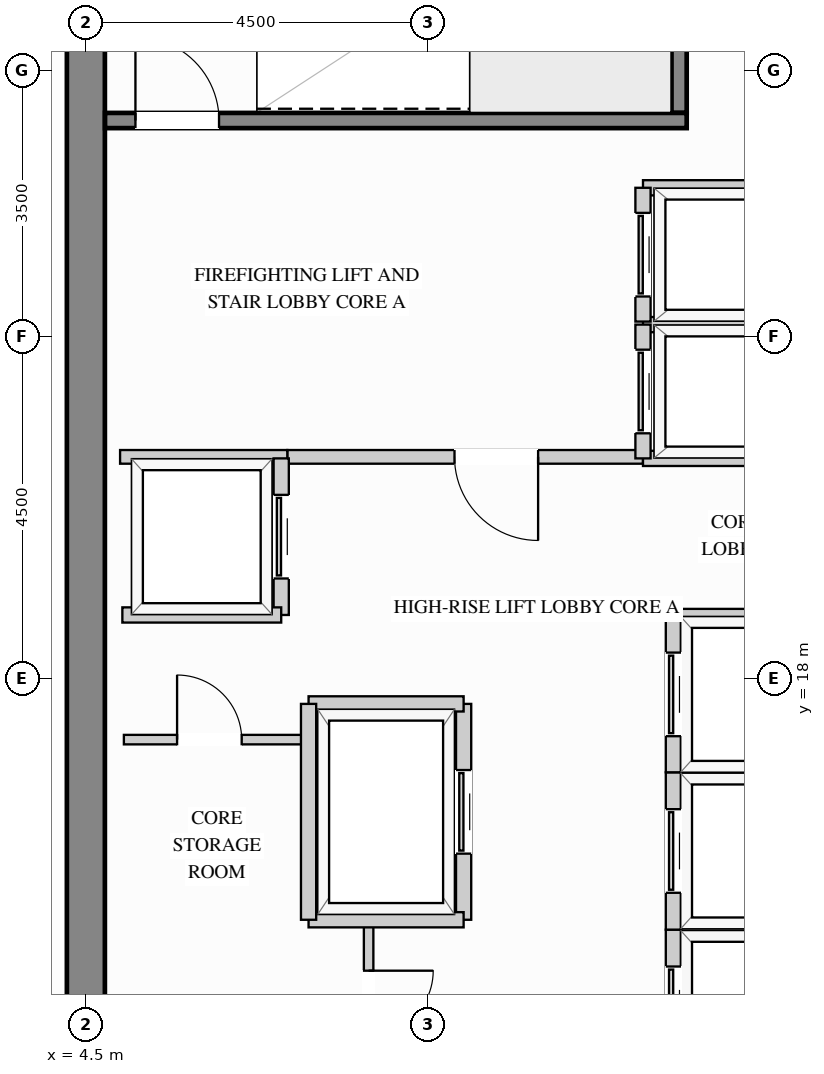
"""IFC4 building model, lengths in metres.
Left out: names, types, materials, properties, quantities, classifications, styles, units other than length and angle.
Written with IfcOpenShell. Run it as: python <this file> out.ifc"""

import sys

from ifc_helpers import new_model, si_unit, direction, frame, frame_2d, origin, place, context, subcontext, project, spatial, rectangle, extrude, source, transform, mapped, element, fill, save


model = new_model("IFC4")
c1 = context("Model", 3, precision=1e-05, world=origin(), true_north=direction((0.0, 1.0)))
c2 = subcontext(c1, "Body", "Model", "MODEL_VIEW")
j1 = project(units=[si_unit("LENGTHUNIT", "METRE"), si_unit("PLANEANGLEUNIT", "RADIAN")], contexts=[c1])
p1 = place(None, origin())
s1 = spatial("IfcSite", under=j1, at=p1, CompositionType="ELEMENT")
p2 = place(p1, origin())
s2 = spatial("IfcBuilding", under=s1, at=p2, CompositionType="ELEMENT")
p3 = place(p2, frame((0.0, 0.0, 216.0)))
s3 = spatial("IfcBuildingStorey", under=s2, at=p3, CompositionType="ELEMENT", Elevation=216.0)
m1 = source(origin(), c2, "Body", "SweptSolid", [
    extrude(rectangle(XDim=20.5, YDim=0.5, at=frame_2d((10.25, 0.0))), origin(), (0.0, 0.0, 1.0), 3.4),
])
p4 = place(p3, frame((4.5, 8.75, 0.0), z_axis=(0.0, 0.0, 1.0), x_axis=(0.0, 1.0, 0.0)))
e1 = element("IfcWall", 1, at=p4, inside=s3, PredefinedType="SHEAR", context=c2, shape_type="MappedRepresentation", body=[
    mapped(m1, transform((0.0, 0.0, 0.0), x_axis=(1.0, 0.0, 0.0), y_axis=(0.0, 1.0, 0.0), z_axis=(0.0, 0.0, 1.0))),
])
p5 = place(p3, frame((7.15, 20.92, 0.0), z_axis=(0.0, 0.0, 1.0), x_axis=(1.0, 0.0, 0.0)))
e2 = element("IfcWall", 2, at=p5, inside=s3, PredefinedType="PARTITIONING", context=c2, shape_type="SweptSolid", body=[
    extrude(rectangle(XDim=4.68, YDim=0.18, at=frame_2d((2.34, 0.0))), origin(), (0.0, 0.0, 1.0), 3.385),
])
p6 = place(p5, frame((2.2, 0.0, 0.0)))
e3 = element("IfcOpeningElement", 3, at=p6, cuts=e2, PredefinedType="OPENING", context=c2, shape_type="SweptSolid", body=[
    extrude(rectangle(XDim=1.1, YDim=2.15, at=frame_2d((0.55, 1.075))), frame((0.0, 0.1, 0.0), z_axis=(0.0, -1.0, 0.0), x_axis=(1.0, 0.0, 0.0)), (0.0, 0.0, 1.0), 0.2),
])
m2 = source(origin(), c2, "Body", "SweptSolid", [
    extrude(rectangle(XDim=2.2, YDim=0.18, at=frame_2d((1.1, 0.0))), origin(), (0.0, 0.0, 1.0), 3.385),
])
p7 = place(p3, frame((4.95, 20.92, 0.0), z_axis=(0.0, 0.0, 1.0), x_axis=(1.0, 0.0, 0.0)))
e4 = element("IfcWall", 4, at=p7, inside=s3, PredefinedType="PARTITIONING", context=c2, shape_type="MappedRepresentation", body=[
    mapped(m2, transform((0.0, 0.0, 0.0), x_axis=(1.0, 0.0, 0.0), y_axis=(0.0, 1.0, 0.0), z_axis=(0.0, 0.0, 1.0))),
])
p8 = place(p3, frame((8.22, 12.75, 0.0), z_axis=(0.0, 0.0, 1.0), x_axis=(0.0, 1.0, 0.0)))
e5 = element("IfcWall", 5, at=p8, inside=s3, PredefinedType="PARTITIONING", context=c2, shape_type="SweptSolid", body=[
    extrude(rectangle(XDim=2.07, YDim=0.125, at=frame_2d((1.035, 0.0))), origin(), (0.0, 0.0, 1.0), 3.385),
])
p9 = place(p8, frame((0.56, 0.0, 0.0)))
e6 = element("IfcOpeningElement", 6, at=p9, cuts=e5, PredefinedType="OPENING", context=c2, shape_type="SweptSolid", body=[
    extrude(rectangle(XDim=0.85, YDim=2.1, at=frame_2d((0.425, 1.05))), frame((0.0, 0.073, 0.0), z_axis=(0.0, -1.0, 0.0), x_axis=(1.0, 0.0, 0.0)), (0.0, 0.0, 1.0), 0.145),
])
p10 = place(p3, frame((5.0, 17.2, 0.0), z_axis=(0.0, 0.0, 1.0), x_axis=(1.0, 0.0, 0.0)))
e7 = element("IfcWall", 7, at=p10, inside=s3, PredefinedType="PARTITIONING", context=c2, shape_type="SweptSolid", body=[
    extrude(rectangle(XDim=2.4, YDim=0.125, at=frame_2d((1.2, 0.0))), origin(), (0.0, 0.0, 1.0), 3.385),
])
p11 = place(p10, frame((0.7, 0.0, 0.0)))
e8 = element("IfcOpeningElement", 8, at=p11, cuts=e7, PredefinedType="OPENING", context=c2, shape_type="SweptSolid", body=[
    extrude(rectangle(XDim=0.85, YDim=2.1, at=frame_2d((0.425, 1.05))), frame((0.0, 0.073, 0.0), z_axis=(0.0, -1.0, 0.0), x_axis=(1.0, 0.0, 0.0)), (0.0, 0.0, 1.0), 0.145),
])
m3 = source(origin(), c2, "Body", "SweptSolid", [
    extrude(rectangle(XDim=2.39, YDim=0.2, at=frame_2d((1.195, 0.0))), origin(), (0.0, 0.0, 1.0), 3.385),
])
for number, where, z_axis, x_axis in (
    (9, (11.83, 22.66, 0.0), (0.0, 0.0, 1.0), (1.0, 0.0, 0.0)),
    (10, (11.83, 20.9, 0.0), (0.0, 0.0, 1.0), (1.0, 0.0, 0.0)),
):
    element("IfcWall", number, at=place(p3, frame(where, z_axis=z_axis, x_axis=x_axis)), inside=s3, PredefinedType="PARTITIONING", context=c2, shape_type="MappedRepresentation", body=[
        mapped(m3, transform((0.0, 0.0, 0.0), x_axis=(1.0, 0.0, 0.0), y_axis=(0.0, 1.0, 0.0), z_axis=(0.0, 0.0, 1.0))),
    ])
p12 = place(p3, frame((11.83, 20.9, 0.0), z_axis=(0.0, 0.0, 1.0), x_axis=(0.0, 1.0, 0.0)))
e11 = element("IfcWall", 11, at=p12, inside=s3, PredefinedType="PARTITIONING", context=c2, shape_type="SweptSolid", body=[
    extrude(rectangle(XDim=1.76, YDim=0.2, at=frame_2d((0.88, 0.0))), origin(), (0.0, 0.0, 1.0), 3.385),
])
p13 = place(p12, frame((0.33, 0.0, 0.0)))
e12 = element("IfcOpeningElement", 12, at=p13, cuts=e11, PredefinedType="OPENING", context=c2, shape_type="SweptSolid", body=[
    extrude(rectangle(XDim=1.1, YDim=2.2, at=frame_2d((0.55, 1.1))), frame((0.0, 0.11, 0.0), z_axis=(0.0, -1.0, 0.0), x_axis=(1.0, 0.0, 0.0)), (0.0, 0.0, 1.0), 0.22),
])
p14 = place(p3, frame((11.83, 24.46, 0.0), z_axis=(0.0, 0.0, 1.0), x_axis=(1.0, 0.0, 0.0)))
e13 = element("IfcWall", 13, at=p14, inside=s3, PredefinedType="PARTITIONING", context=c2, shape_type="MappedRepresentation", body=[
    mapped(m3, transform((0.0, 0.0, 0.0), x_axis=(1.0, 0.0, 0.0), y_axis=(0.0, 1.0, 0.0), z_axis=(0.0, 0.0, 1.0))),
])
p15 = place(p3, frame((11.83, 22.7, 0.0), z_axis=(0.0, 0.0, 1.0), x_axis=(0.0, 1.0, 0.0)))
e14 = element("IfcWall", 14, at=p15, inside=s3, PredefinedType="PARTITIONING", context=c2, shape_type="SweptSolid", body=[
    extrude(rectangle(XDim=1.76, YDim=0.2, at=frame_2d((0.88, 0.0))), origin(), (0.0, 0.0, 1.0), 3.385),
])
p16 = place(p15, frame((0.33, 0.0, 0.0)))
e15 = element("IfcOpeningElement", 15, at=p16, cuts=e14, PredefinedType="OPENING", context=c2, shape_type="SweptSolid", body=[
    extrude(rectangle(XDim=1.1, YDim=2.2, at=frame_2d((0.55, 1.1))), frame((0.0, 0.11, 0.0), z_axis=(0.0, -1.0, 0.0), x_axis=(1.0, 0.0, 0.0)), (0.0, 0.0, 1.0), 0.22),
])
m4 = source(origin(), c2, "Body", "SweptSolid", [
    extrude(rectangle(XDim=1.99, YDim=0.2, at=frame_2d((0.995, 0.0))), origin(), (0.0, 0.0, 1.0), 3.385),
])
p17 = place(p3, frame((12.23, 14.7, 0.0), z_axis=(0.0, 0.0, 1.0), x_axis=(1.0, 0.0, 0.0)))
e16 = element("IfcWall", 16, at=p17, inside=s3, PredefinedType="PARTITIONING", context=c2, shape_type="MappedRepresentation", body=[
    mapped(m4, transform((0.0, 0.0, 0.0), x_axis=(1.0, 0.0, 0.0), y_axis=(0.0, 1.0, 0.0), z_axis=(0.0, 0.0, 1.0))),
])
p18 = place(p3, frame((12.23, 12.63, 0.0), z_axis=(0.0, 0.0, 1.0), x_axis=(0.0, 1.0, 0.0)))
e17 = element("IfcWall", 17, at=p18, inside=s3, PredefinedType="PARTITIONING", context=c2, shape_type="SweptSolid", body=[
    extrude(rectangle(XDim=2.07, YDim=0.2, at=frame_2d((1.035, 0.0))), origin(), (0.0, 0.0, 1.0), 3.385),
])
p19 = place(p18, frame((0.485, 0.0, 0.0)))
e18 = element("IfcOpeningElement", 18, at=p19, cuts=e17, PredefinedType="OPENING", context=c2, shape_type="SweptSolid", body=[
    extrude(rectangle(XDim=1.1, YDim=2.2, at=frame_2d((0.55, 1.1))), frame((0.0, 0.11, 0.0), z_axis=(0.0, -1.0, 0.0), x_axis=(1.0, 0.0, 0.0)), (0.0, 0.0, 1.0), 0.22),
])
p20 = place(p3, frame((12.23, 16.77, 0.0), z_axis=(0.0, 0.0, 1.0), x_axis=(1.0, 0.0, 0.0)))
e19 = element("IfcWall", 19, at=p20, inside=s3, PredefinedType="PARTITIONING", context=c2, shape_type="MappedRepresentation", body=[
    mapped(m4, transform((0.0, 0.0, 0.0), x_axis=(1.0, 0.0, 0.0), y_axis=(0.0, 1.0, 0.0), z_axis=(0.0, 0.0, 1.0))),
])
p21 = place(p3, frame((12.23, 14.7, 0.0), z_axis=(0.0, 0.0, 1.0), x_axis=(0.0, 1.0, 0.0)))
e20 = element("IfcWall", 20, at=p21, inside=s3, PredefinedType="PARTITIONING", context=c2, shape_type="SweptSolid", body=[
    extrude(rectangle(XDim=2.07, YDim=0.2, at=frame_2d((1.035, 0.0))), origin(), (0.0, 0.0, 1.0), 3.385),
])
p22 = place(p21, frame((0.485, 0.0, 0.0)))
e21 = element("IfcOpeningElement", 21, at=p22, cuts=e20, PredefinedType="OPENING", context=c2, shape_type="SweptSolid", body=[
    extrude(rectangle(XDim=1.1, YDim=2.2, at=frame_2d((0.55, 1.1))), frame((0.0, 0.11, 0.0), z_axis=(0.0, -1.0, 0.0), x_axis=(1.0, 0.0, 0.0)), (0.0, 0.0, 1.0), 0.22),
])
p23 = place(p3, frame((12.23, 18.82, 0.0), z_axis=(0.0, 0.0, 1.0), x_axis=(1.0, 0.0, 0.0)))
e22 = element("IfcWall", 22, at=p23, inside=s3, PredefinedType="PARTITIONING", context=c2, shape_type="MappedRepresentation", body=[
    mapped(m4, transform((0.0, 0.0, 0.0), x_axis=(1.0, 0.0, 0.0), y_axis=(0.0, 1.0, 0.0), z_axis=(0.0, 0.0, 1.0))),
])
p24 = place(p3, frame((12.23, 16.77, 0.0), z_axis=(0.0, 0.0, 1.0), x_axis=(0.0, 1.0, 0.0)))
e23 = element("IfcWall", 23, at=p24, inside=s3, PredefinedType="PARTITIONING", context=c2, shape_type="SweptSolid", body=[
    extrude(rectangle(XDim=2.05, YDim=0.2, at=frame_2d((1.025, 0.0))), origin(), (0.0, 0.0, 1.0), 3.385),
])
p25 = place(p24, frame((0.475, 0.0, 0.0)))
e24 = element("IfcOpeningElement", 24, at=p25, cuts=e23, PredefinedType="OPENING", context=c2, shape_type="SweptSolid", body=[
    extrude(rectangle(XDim=1.1, YDim=2.2, at=frame_2d((0.55, 1.1))), frame((0.0, 0.11, 0.0), z_axis=(0.0, -1.0, 0.0), x_axis=(1.0, 0.0, 0.0)), (0.0, 0.0, 1.0), 0.22),
])
p26 = place(p3, frame((7.07, 18.84, 0.0), z_axis=(0.0, 0.0, 1.0), x_axis=(0.0, 1.0, 0.0)))
e25 = element("IfcWall", 25, at=p26, inside=s3, PredefinedType="PARTITIONING", context=c2, shape_type="SweptSolid", body=[
    extrude(rectangle(XDim=2.06, YDim=0.2, at=frame_2d((1.03, 0.0))), origin(), (0.0, 0.0, 1.0), 3.385),
])
p27 = place(p26, frame((0.48, 0.0, 0.0)))
e26 = element("IfcOpeningElement", 26, at=p27, cuts=e25, PredefinedType="OPENING", context=c2, shape_type="SweptSolid", body=[
    extrude(rectangle(XDim=1.1, YDim=2.2, at=frame_2d((0.55, 1.1))), frame((0.0, 0.11, 0.0), z_axis=(0.0, -1.0, 0.0), x_axis=(1.0, 0.0, 0.0)), (0.0, 0.0, 1.0), 0.22),
])
m5 = source(origin(), c2, "Body", "SweptSolid", [
    extrude(rectangle(XDim=2.09, YDim=0.2, at=frame_2d((1.045, 0.0))), origin(), (0.0, 0.0, 1.0), 3.385),
])
p28 = place(p3, frame((4.98, 18.84, 0.0), z_axis=(0.0, 0.0, 1.0), x_axis=(1.0, 0.0, 0.0)))
e27 = element("IfcWall", 27, at=p28, inside=s3, PredefinedType="PARTITIONING", context=c2, shape_type="MappedRepresentation", body=[
    mapped(m5, transform((0.0, 0.0, 0.0), x_axis=(1.0, 0.0, 0.0), y_axis=(0.0, 1.0, 0.0), z_axis=(0.0, 0.0, 1.0))),
])
p29 = place(p3, frame((9.47, 14.83, 0.0), z_axis=(0.0, 0.0, 1.0), x_axis=(0.0, 1.0, 0.0)))
e28 = element("IfcWall", 28, at=p29, inside=s3, PredefinedType="PARTITIONING", context=c2, shape_type="SweptSolid", body=[
    extrude(rectangle(XDim=2.84, YDim=0.2, at=frame_2d((1.42, 0.0))), origin(), (0.0, 0.0, 1.0), 3.385),
])
p30 = place(p29, frame((0.87, 0.0, 0.0)))
e29 = element("IfcOpeningElement", 29, at=p30, cuts=e28, PredefinedType="OPENING", context=c2, shape_type="SweptSolid", body=[
    extrude(rectangle(XDim=1.1, YDim=2.2, at=frame_2d((0.55, 1.1))), frame((0.0, 0.11, 0.0), z_axis=(0.0, -1.0, 0.0), x_axis=(1.0, 0.0, 0.0)), (0.0, 0.0, 1.0), 0.22),
])
m6 = source(origin(), c2, "Body", "SweptSolid", [
    extrude(rectangle(XDim=2.04, YDim=0.2, at=frame_2d((1.02, 0.0))), origin(), (0.0, 0.0, 1.0), 3.385),
])
for number, where, z_axis, x_axis in (
    (30, (7.43, 17.67, 0.0), (0.0, 0.0, 1.0), (1.0, 0.0, 0.0)),
    (31, (7.43, 14.83, 0.0), (0.0, 0.0, 1.0), (1.0, 0.0, 0.0)),
):
    element("IfcWall", number, at=place(p3, frame(where, z_axis=z_axis, x_axis=x_axis)), inside=s3, PredefinedType="PARTITIONING", context=c2, shape_type="MappedRepresentation", body=[
        mapped(m6, transform((0.0, 0.0, 0.0), x_axis=(1.0, 0.0, 0.0), y_axis=(0.0, 1.0, 0.0), z_axis=(0.0, 0.0, 1.0))),
    ])
m7 = source(origin(), c2, "Body", "SweptSolid", [
    extrude(rectangle(XDim=2.84, YDim=0.2, at=frame_2d((1.42, 0.0))), origin(), (0.0, 0.0, 1.0), 3.385),
])
p31 = place(p3, frame((7.43, 14.83, 0.0), z_axis=(0.0, 0.0, 1.0), x_axis=(0.0, 1.0, 0.0)))
e32 = element("IfcWall", 32, at=p31, inside=s3, PredefinedType="PARTITIONING", context=c2, shape_type="MappedRepresentation", body=[
    mapped(m7, transform((0.0, 0.0, 0.0), x_axis=(1.0, 0.0, 0.0), y_axis=(0.0, 1.0, 0.0), z_axis=(0.0, 0.0, 1.0))),
])
m8 = source(origin(), c2, "Body", "SweptSolid", [
    extrude(rectangle(XDim=3.803, YDim=0.2, at=frame_2d((1.901, 0.0))), origin(), (0.0, 0.0, 1.0), 3.4),
])
p32 = place(p3, frame((12.305, 25.445, 0.0), z_axis=(0.0, 0.0, 1.0), x_axis=(0.0, 1.0, 0.0)))
e33 = element("IfcWall", 33, at=p32, inside=s3, PredefinedType="SHEAR", context=c2, shape_type="MappedRepresentation", body=[
    mapped(m8, transform((0.0, 0.0, 0.0), x_axis=(1.0, 0.0, 0.0), y_axis=(0.0, 1.0, 0.0), z_axis=(0.0, 0.0, 1.0))),
])
p33 = place(p3, frame((4.752, 25.345, 0.0), z_axis=(0.0, 0.0, 1.0), x_axis=(1.0, 0.0, 0.0)))
e34 = element("IfcWall", 34, at=p33, inside=s3, PredefinedType="SHEAR", context=c2, shape_type="SweptSolid", body=[
    extrude(rectangle(XDim=7.653, YDim=0.2, at=frame_2d((3.827, 0.0))), origin(), (0.0, 0.0, 1.0), 3.4),
])
p34 = place(p33, frame((0.4, 0.0, 0.0)))
e35 = element("IfcOpeningElement", 35, at=p34, cuts=e34, PredefinedType="OPENING", context=c2, shape_type="SweptSolid", body=[
    extrude(rectangle(XDim=1.1, YDim=2.15, at=frame_2d((0.55, 1.075))), frame((0.0, 0.11, 0.0), z_axis=(0.0, -1.0, 0.0), x_axis=(1.0, 0.0, 0.0)), (0.0, 0.0, 1.0), 0.22),
])
m9 = source(origin(), c2, "Body", "SweptSolid", [
    extrude(rectangle(XDim=1.1, YDim=2.15, at=frame_2d((0.55, 1.075))), frame((0.0, 0.025, 0.0), z_axis=(0.0, -1.0, 0.0), x_axis=(1.0, 0.0, 0.0)), (0.0, 0.0, 1.0), 0.05),
])
p35 = place(p6, origin())
e36 = element("IfcDoor", 36, at=p35, inside=s3, OperationType="SINGLE_SWING_RIGHT", PredefinedType="DOOR", context=c2, shape_type="MappedRepresentation", body=[
    mapped(m9, transform((0.0, 0.0, 0.0), x_axis=(1.0, 0.0, 0.0), y_axis=(0.0, 1.0, 0.0), z_axis=(0.0, 0.0, 1.0))),
])
fill(e3, e36)
m10 = source(origin(), c2, "Body", "SweptSolid", [
    extrude(rectangle(XDim=1.1, YDim=2.2, at=frame_2d((0.55, 1.1))), frame((0.0, 0.025, 0.0), z_axis=(0.0, -1.0, 0.0), x_axis=(1.0, 0.0, 0.0)), (0.0, 0.0, 1.0), 0.05),
])
p36 = place(p13, origin())
e37 = element("IfcDoor", 37, at=p36, inside=s3, OperationType="SLIDING_TO_LEFT", PredefinedType="DOOR", context=c2, shape_type="MappedRepresentation", body=[
    mapped(m10, transform((0.0, 0.0, 0.0), x_axis=(1.0, 0.0, 0.0), y_axis=(0.0, 1.0, 0.0), z_axis=(0.0, 0.0, 1.0))),
])
fill(e12, e37)
p37 = place(p16, origin())
e38 = element("IfcDoor", 38, at=p37, inside=s3, OperationType="SLIDING_TO_LEFT", PredefinedType="DOOR", context=c2, shape_type="MappedRepresentation", body=[
    mapped(m10, transform((0.0, 0.0, 0.0), x_axis=(1.0, 0.0, 0.0), y_axis=(0.0, 1.0, 0.0), z_axis=(0.0, 0.0, 1.0))),
])
fill(e15, e38)
p38 = place(p19, origin())
e39 = element("IfcDoor", 39, at=p38, inside=s3, OperationType="SLIDING_TO_LEFT", PredefinedType="DOOR", context=c2, shape_type="MappedRepresentation", body=[
    mapped(m10, transform((0.0, 0.0, 0.0), x_axis=(1.0, 0.0, 0.0), y_axis=(0.0, 1.0, 0.0), z_axis=(0.0, 0.0, 1.0))),
])
fill(e18, e39)
p39 = place(p22, origin())
e40 = element("IfcDoor", 40, at=p39, inside=s3, OperationType="SLIDING_TO_LEFT", PredefinedType="DOOR", context=c2, shape_type="MappedRepresentation", body=[
    mapped(m10, transform((0.0, 0.0, 0.0), x_axis=(1.0, 0.0, 0.0), y_axis=(0.0, 1.0, 0.0), z_axis=(0.0, 0.0, 1.0))),
])
fill(e21, e40)
p40 = place(p25, origin())
e41 = element("IfcDoor", 41, at=p40, inside=s3, OperationType="SLIDING_TO_LEFT", PredefinedType="DOOR", context=c2, shape_type="MappedRepresentation", body=[
    mapped(m10, transform((0.0, 0.0, 0.0), x_axis=(1.0, 0.0, 0.0), y_axis=(0.0, 1.0, 0.0), z_axis=(0.0, 0.0, 1.0))),
])
fill(e24, e41)
p41 = place(p27, origin())
e42 = element("IfcDoor", 42, at=p41, inside=s3, OperationType="SLIDING_TO_LEFT", PredefinedType="DOOR", context=c2, shape_type="MappedRepresentation", body=[
    mapped(m10, transform((0.0, 0.0, 0.0), x_axis=(1.0, 0.0, 0.0), y_axis=(0.0, 1.0, 0.0), z_axis=(0.0, 0.0, 1.0))),
])
fill(e26, e42)
p42 = place(p30, origin())
e43 = element("IfcDoor", 43, at=p42, inside=s3, OperationType="SLIDING_TO_LEFT", PredefinedType="DOOR", context=c2, shape_type="MappedRepresentation", body=[
    mapped(m10, transform((0.0, 0.0, 0.0), x_axis=(1.0, 0.0, 0.0), y_axis=(0.0, 1.0, 0.0), z_axis=(0.0, 0.0, 1.0))),
])
fill(e29, e43)
m11 = source(origin(), c2, "Body", "SweptSolid", [
    extrude(rectangle(XDim=0.85, YDim=2.1, at=frame_2d((0.425, 1.05))), frame((0.0, 0.025, 0.0), z_axis=(0.0, -1.0, 0.0), x_axis=(1.0, 0.0, 0.0)), (0.0, 0.0, 1.0), 0.05),
])
p43 = place(p11, origin())
e44 = element("IfcDoor", 44, at=p43, inside=s3, OperationType="SINGLE_SWING_LEFT", PredefinedType="DOOR", context=c2, shape_type="MappedRepresentation", body=[
    mapped(m11, transform((0.0, 0.0, 0.0), x_axis=(1.0, 0.0, 0.0), y_axis=(0.0, 1.0, 0.0), z_axis=(0.0, 0.0, 1.0))),
])
fill(e8, e44)
p44 = place(p9, origin())
e45 = element("IfcDoor", 45, at=p44, inside=s3, OperationType="SINGLE_SWING_RIGHT", PredefinedType="DOOR", context=c2, shape_type="MappedRepresentation", body=[
    mapped(m11, transform((0.0, 0.0, 0.0), x_axis=(1.0, 0.0, 0.0), y_axis=(0.0, 1.0, 0.0), z_axis=(0.0, 0.0, 1.0))),
])
fill(e6, e45)
m12 = source(origin(), c2, "Body", "SweptSolid", [
    extrude(rectangle(XDim=1.1, YDim=2.15, at=frame_2d((0.55, 1.075))), frame((0.0, 0.025, 0.0), z_axis=(0.0, -1.0, 0.0), x_axis=(1.0, 0.0, 0.0)), (0.0, 0.0, 1.0), 0.05),
])
p45 = place(p34, origin())
e46 = element("IfcDoor", 46, at=p45, inside=s3, OperationType="SINGLE_SWING_LEFT", PredefinedType="DOOR", context=c2, shape_type="MappedRepresentation", body=[
    mapped(m12, transform((0.0, 0.0, 0.0), x_axis=(1.0, 0.0, 0.0), y_axis=(0.0, 1.0, 0.0), z_axis=(0.0, 0.0, 1.0))),
])
fill(e35, e46)
save(model, sys.argv[1])
